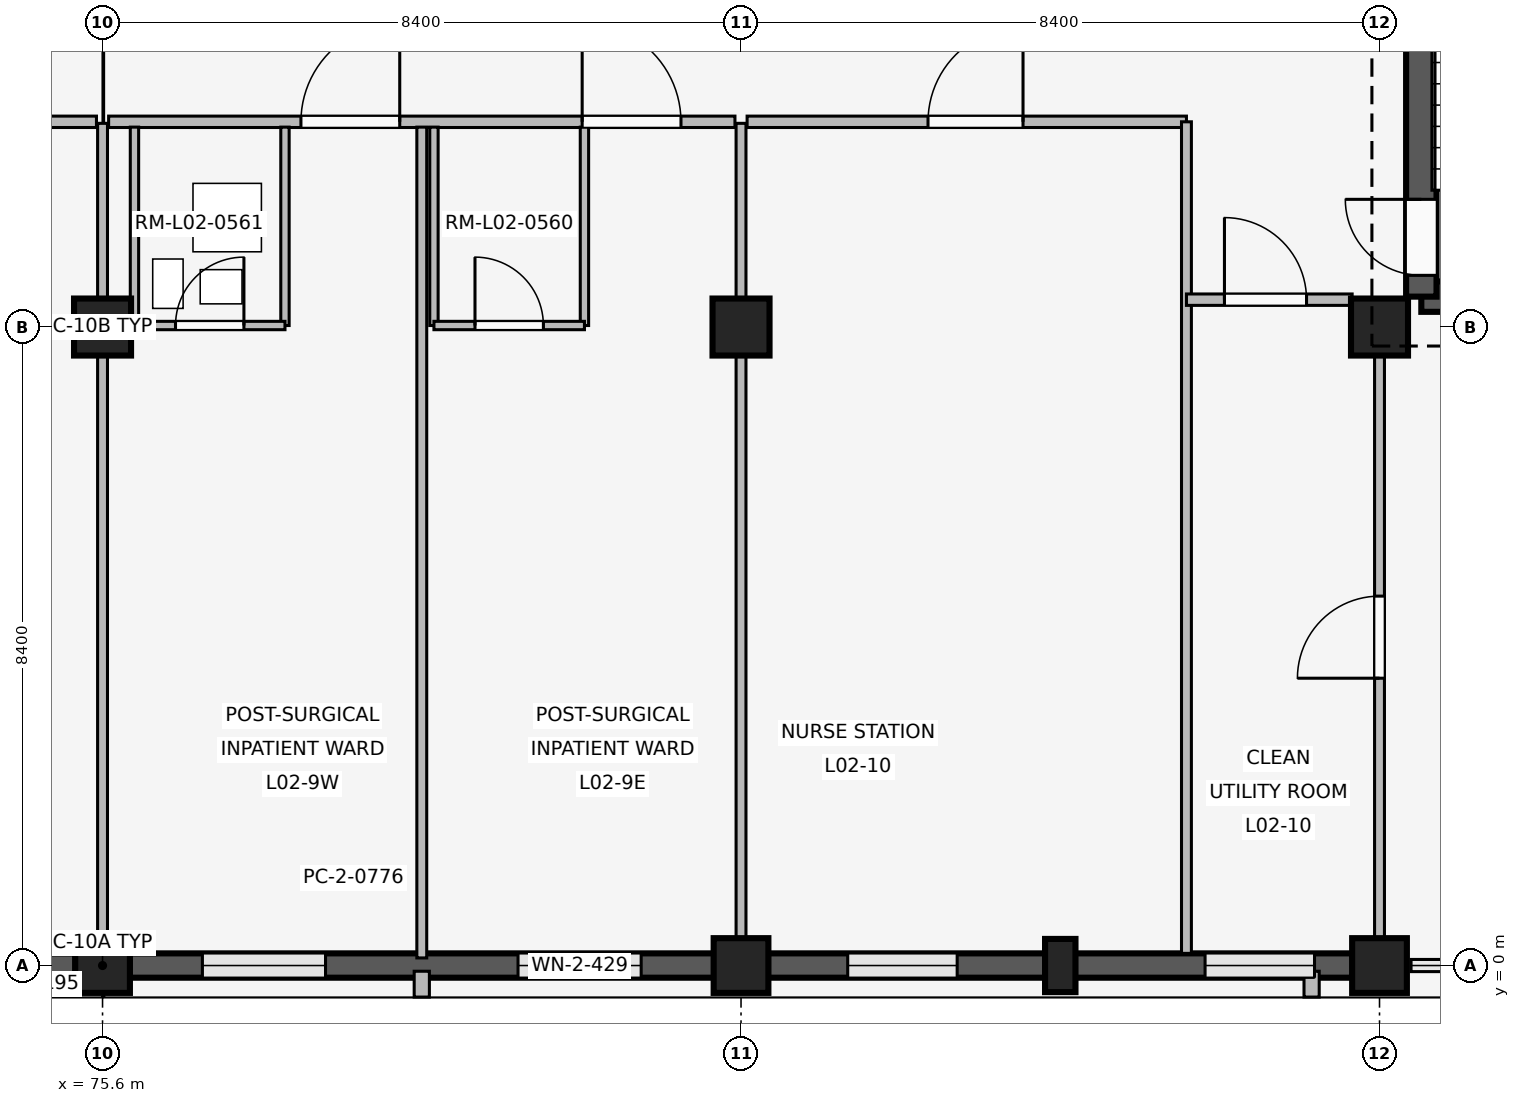
"""IFC4 building model, lengths in metres.
Left out: names, types, materials, properties, quantities, classifications, styles, units other than length and angle.
Written with IfcOpenShell. Run it as: python <this file> out.ifc"""

import sys

from ifc_helpers import new_model, si_unit, direction, frame, frame_2d, origin, origin_2d, place, context, subcontext, project, spatial, rectangle, extrude, element, fill, save


model = new_model("IFC4")
c1 = context("Model", 3, precision=1e-05, world=origin(), true_north=direction((0.0, 1.0)))
c2 = subcontext(c1, "Body", "Model", "MODEL_VIEW")
j1 = project(units=[si_unit("LENGTHUNIT", "METRE"), si_unit("PLANEANGLEUNIT", "RADIAN")], contexts=[c1])
p1 = place(None, origin())
s1 = spatial("IfcSite", under=j1, at=p1, CompositionType="ELEMENT")
p2 = place(p1, origin())
s2 = spatial("IfcBuilding", under=s1, at=p2, CompositionType="ELEMENT")
p3 = place(p2, frame((0.0, 0.0, 8.1)))
s3 = spatial("IfcBuildingStorey", under=s2, at=p3, CompositionType="ELEMENT", Elevation=8.1)
p4 = place(p3, frame((75.6, 0.0, 0.0), z_axis=(0.0, 0.0, 1.0), x_axis=(1.0, 0.0, 0.0)))
e1 = element("IfcColumn", 1, at=p4, inside=s3, PredefinedType="COLUMN", context=c2, shape_type="SweptSolid", body=[
    extrude(rectangle(XDim=0.72, YDim=0.72, at=origin_2d()), origin(), (0.0, 0.0, 1.0), 4.8),
])
p5 = place(p3, frame((75.6, 8.4, 0.0), z_axis=(0.0, 0.0, 1.0), x_axis=(1.0, 0.0, 0.0)))
e2 = element("IfcColumn", 2, at=p5, inside=s3, PredefinedType="COLUMN", context=c2, shape_type="SweptSolid", body=[
    extrude(rectangle(XDim=0.75, YDim=0.75, at=origin_2d()), origin(), (0.0, 0.0, 1.0), 4.8),
])
p6 = place(p3, frame((84.0, 0.0, 0.0), z_axis=(0.0, 0.0, 1.0), x_axis=(1.0, 0.0, 0.0)))
e3 = element("IfcColumn", 3, at=p6, inside=s3, PredefinedType="COLUMN", context=c2, shape_type="SweptSolid", body=[
    extrude(rectangle(XDim=0.72, YDim=0.72, at=origin_2d()), origin(), (0.0, 0.0, 1.0), 4.8),
])
p7 = place(p3, frame((84.0, 8.4, 0.0), z_axis=(0.0, 0.0, 1.0), x_axis=(1.0, 0.0, 0.0)))
e4 = element("IfcColumn", 4, at=p7, inside=s3, PredefinedType="COLUMN", context=c2, shape_type="SweptSolid", body=[
    extrude(rectangle(XDim=0.75, YDim=0.75, at=origin_2d()), origin(), (0.0, 0.0, 1.0), 4.8),
])
p8 = place(p3, frame((92.4, 0.0, 0.0), z_axis=(0.0, 0.0, 1.0), x_axis=(1.0, 0.0, 0.0)))
e5 = element("IfcColumn", 5, at=p8, inside=s3, PredefinedType="COLUMN", context=c2, shape_type="SweptSolid", body=[
    extrude(rectangle(XDim=0.72, YDim=0.72, at=origin_2d()), origin(), (0.0, 0.0, 1.0), 4.8),
])
p9 = place(p3, frame((92.4, 8.4, 0.0), z_axis=(0.0, 0.0, 1.0), x_axis=(1.0, 0.0, 0.0)))
e6 = element("IfcColumn", 6, at=p9, inside=s3, PredefinedType="COLUMN", context=c2, shape_type="SweptSolid", body=[
    extrude(rectangle(XDim=0.75, YDim=0.75, at=origin_2d()), origin(), (0.0, 0.0, 1.0), 4.8),
])
p10 = place(p3, frame((88.2, 0.0, 0.0), z_axis=(0.0, 0.0, 1.0), x_axis=(1.0, 0.0, 0.0)))
e7 = element("IfcColumn", 7, at=p10, inside=s3, PredefinedType="PILASTER", context=c2, shape_type="SweptSolid", body=[
    extrude(rectangle(XDim=0.4, YDim=0.7, at=origin_2d()), origin(), (0.0, 0.0, 1.0), 4.8),
])
p11 = place(p3, frame((75.245, 0.0, 0.0), z_axis=(0.0, 0.0, 1.0), x_axis=(-1.0, 0.0, 0.0)))
e8 = element("IfcWall", 8, at=p11, inside=s3, PredefinedType="SOLIDWALL", context=c2, shape_type="SweptSolid", body=[
    extrude(rectangle(XDim=7.69, YDim=0.32, at=frame_2d((3.845, 0.0))), origin(), (0.0, 0.0, 1.0), 3.86),
])
p12 = place(p11, frame((0.989, 0.0, 0.85)))
e9 = element("IfcOpeningElement", 9, at=p12, cuts=e8, PredefinedType="OPENING", context=c2, shape_type="SweptSolid", body=[
    extrude(rectangle(XDim=1.56, YDim=1.7, at=frame_2d((0.78, 0.85))), frame((0.0, 0.17, 0.0), z_axis=(0.0, -1.0, 0.0), x_axis=(1.0, 0.0, 0.0)), (0.0, 0.0, 1.0), 0.34),
])
p13 = place(p11, frame((5.141, 0.0, 0.85)))
e10 = element("IfcOpeningElement", 10, at=p13, cuts=e8, PredefinedType="OPENING", context=c2, shape_type="SweptSolid", body=[
    extrude(rectangle(XDim=1.56, YDim=1.7, at=frame_2d((0.78, 0.85))), frame((0.0, 0.17, 0.0), z_axis=(0.0, -1.0, 0.0), x_axis=(1.0, 0.0, 0.0)), (0.0, 0.0, 1.0), 0.34),
])
p14 = place(p3, frame((83.645, 0.0, 0.0), z_axis=(0.0, 0.0, 1.0), x_axis=(-1.0, 0.0, 0.0)))
e11 = element("IfcWall", 11, at=p14, inside=s3, PredefinedType="SOLIDWALL", context=c2, shape_type="SweptSolid", body=[
    extrude(rectangle(XDim=7.69, YDim=0.32, at=frame_2d((3.845, 0.0))), origin(), (0.0, 0.0, 1.0), 3.86),
])
p15 = place(p14, frame((0.959, 0.0, 0.85)))
e12 = element("IfcOpeningElement", 12, at=p15, cuts=e11, PredefinedType="OPENING", context=c2, shape_type="SweptSolid", body=[
    extrude(rectangle(XDim=1.62, YDim=1.8, at=frame_2d((0.81, 0.9))), frame((0.0, 0.17, 0.0), z_axis=(0.0, -1.0, 0.0), x_axis=(1.0, 0.0, 0.0)), (0.0, 0.0, 1.0), 0.34),
])
p16 = place(p14, frame((5.111, 0.0, 0.85)))
e13 = element("IfcOpeningElement", 13, at=p16, cuts=e11, PredefinedType="OPENING", context=c2, shape_type="SweptSolid", body=[
    extrude(rectangle(XDim=1.62, YDim=1.8, at=frame_2d((0.81, 0.9))), frame((0.0, 0.17, 0.0), z_axis=(0.0, -1.0, 0.0), x_axis=(1.0, 0.0, 0.0)), (0.0, 0.0, 1.0), 0.34),
])
p17 = place(p3, frame((79.8, -0.075, 0.0), z_axis=(0.0, 0.0, 1.0), x_axis=(0.0, -1.0, 0.0)))
e14 = element("IfcWall", 14, at=p17, inside=s3, PredefinedType="ELEMENTEDWALL", context=c2, shape_type="SweptSolid", body=[
    extrude(rectangle(XDim=0.34, YDim=0.2, at=frame_2d((0.17, 0.0))), origin(), (0.0, 0.0, 1.0), 3.84),
])
p18 = place(p3, frame((92.045, 0.0, 0.0), z_axis=(0.0, 0.0, 1.0), x_axis=(-1.0, 0.0, 0.0)))
e15 = element("IfcWall", 15, at=p18, inside=s3, PredefinedType="SOLIDWALL", context=c2, shape_type="SweptSolid", body=[
    extrude(rectangle(XDim=7.69, YDim=0.32, at=frame_2d((3.845, 0.0))), origin(), (0.0, 0.0, 1.0), 3.86),
])
p19 = place(p18, frame((0.5, 0.0, 0.85)))
e16 = element("IfcOpeningElement", 16, at=p19, cuts=e15, PredefinedType="OPENING", context=c2, shape_type="SweptSolid", body=[
    extrude(rectangle(XDim=1.44, YDim=1.62, at=frame_2d((0.72, 0.81))), frame((0.0, 0.17, 0.0), z_axis=(0.0, -1.0, 0.0), x_axis=(1.0, 0.0, 0.0)), (0.0, 0.0, 1.0), 0.34),
])
p20 = place(p18, frame((5.201, 0.0, 0.85)))
e17 = element("IfcOpeningElement", 17, at=p20, cuts=e15, PredefinedType="OPENING", context=c2, shape_type="SweptSolid", body=[
    extrude(rectangle(XDim=1.44, YDim=1.62, at=frame_2d((0.72, 0.81))), frame((0.0, 0.17, 0.0), z_axis=(0.0, -1.0, 0.0), x_axis=(1.0, 0.0, 0.0)), (0.0, 0.0, 1.0), 0.34),
])
p21 = place(p3, frame((91.507, -0.075, 0.0), z_axis=(0.0, 0.0, 1.0), x_axis=(0.0, -1.0, 0.0)))
e18 = element("IfcWall", 18, at=p21, inside=s3, PredefinedType="ELEMENTEDWALL", context=c2, shape_type="SweptSolid", body=[
    extrude(rectangle(XDim=0.34, YDim=0.2, at=frame_2d((0.17, 0.0))), origin(), (0.0, 0.0, 1.0), 3.84),
])
p22 = place(p3, frame((92.95, 8.8, 0.0), z_axis=(0.0, 0.0, 1.0), x_axis=(1.0, 0.0, 0.0)))
e19 = element("IfcWall", 19, at=p22, inside=s3, PredefinedType="SHEAR", context=c2, shape_type="SweptSolid", body=[
    extrude(rectangle(XDim=7.5, YDim=0.4, at=frame_2d((3.75, 0.0))), origin(), (0.0, 0.0, 1.0), 4.52),
])
p23 = place(p22, frame((4.85, 0.0, 0.0)))
e20 = element("IfcOpeningElement", 20, at=p23, cuts=e19, PredefinedType="OPENING", context=c2, shape_type="SweptSolid", body=[
    extrude(rectangle(XDim=1.2, YDim=2.2, at=frame_2d((0.6, 1.1))), frame((0.0, 0.21, 0.0), z_axis=(0.0, -1.0, 0.0), x_axis=(1.0, 0.0, 0.0)), (0.0, 0.0, 1.0), 0.42),
])
p24 = place(p3, frame((92.95, 8.8, 0.0), z_axis=(0.0, 0.0, 1.0), x_axis=(0.0, 1.0, 0.0)))
e21 = element("IfcWall", 21, at=p24, inside=s3, PredefinedType="SHEAR", context=c2, shape_type="SweptSolid", body=[
    extrude(rectangle(XDim=7.55, YDim=0.4, at=frame_2d((3.775, 0.0))), origin(), (0.0, 0.0, 1.0), 4.52),
])
p25 = place(p24, frame((0.28, 0.0, 0.0)))
e22 = element("IfcOpeningElement", 22, at=p25, cuts=e21, PredefinedType="OPENING", context=c2, shape_type="SweptSolid", body=[
    extrude(rectangle(XDim=1.0, YDim=2.15, at=frame_2d((0.5, 1.075))), frame((0.0, 0.21, 0.0), z_axis=(0.0, -1.0, 0.0), x_axis=(1.0, 0.0, 0.0)), (0.0, 0.0, 1.0), 0.42),
])
p26 = place(p3, frame((67.28, 11.1, 0.0), z_axis=(0.0, 0.0, 1.0), x_axis=(1.0, 0.0, 0.0)))
e23 = element("IfcWall", 23, at=p26, inside=s3, PredefinedType="PARTITIONING", context=c2, shape_type="SweptSolid", body=[
    extrude(rectangle(XDim=8.24, YDim=0.15, at=frame_2d((4.12, 0.0))), origin(), (0.0, 0.0, 1.0), 3.84),
])
p27 = place(p26, frame((2.53, 0.0, 0.0)))
e24 = element("IfcOpeningElement", 24, at=p27, cuts=e23, PredefinedType="OPENING", context=c2, shape_type="SweptSolid", body=[
    extrude(rectangle(XDim=1.35, YDim=2.25, at=frame_2d((0.675, 1.125))), frame((0.0, 0.085, 0.0), z_axis=(0.0, -1.0, 0.0), x_axis=(1.0, 0.0, 0.0)), (0.0, 0.0, 1.0), 0.17),
])
p28 = place(p26, frame((6.23, 0.0, 0.0)))
e25 = element("IfcOpeningElement", 25, at=p28, cuts=e23, PredefinedType="OPENING", context=c2, shape_type="SweptSolid", body=[
    extrude(rectangle(XDim=1.35, YDim=2.25, at=frame_2d((0.675, 1.125))), frame((0.0, 0.085, 0.0), z_axis=(0.0, -1.0, 0.0), x_axis=(1.0, 0.0, 0.0)), (0.0, 0.0, 1.0), 0.17),
])
p29 = place(p3, frame((75.6, 0.14, 0.0), z_axis=(0.0, 0.0, 1.0), x_axis=(0.0, 1.0, 0.0)))
e26 = element("IfcWall", 26, at=p29, inside=s3, PredefinedType="PARTITIONING", context=c2, shape_type="SweptSolid", body=[
    extrude(rectangle(XDim=10.94, YDim=0.13, at=frame_2d((5.47, 0.0))), origin(), (0.0, 0.0, 1.0), 3.84),
])
p30 = place(p3, frame((75.68, 11.1, 0.0), z_axis=(0.0, 0.0, 1.0), x_axis=(1.0, 0.0, 0.0)))
e27 = element("IfcWall", 27, at=p30, inside=s3, PredefinedType="PARTITIONING", context=c2, shape_type="SweptSolid", body=[
    extrude(rectangle(XDim=8.24, YDim=0.15, at=frame_2d((4.12, 0.0))), origin(), (0.0, 0.0, 1.0), 3.84),
])
p31 = place(p30, frame((2.53, 0.0, 0.0)))
e28 = element("IfcOpeningElement", 28, at=p31, cuts=e27, PredefinedType="OPENING", context=c2, shape_type="SweptSolid", body=[
    extrude(rectangle(XDim=1.3, YDim=2.25, at=frame_2d((0.65, 1.125))), frame((0.0, 0.085, 0.0), z_axis=(0.0, -1.0, 0.0), x_axis=(1.0, 0.0, 0.0)), (0.0, 0.0, 1.0), 0.17),
])
p32 = place(p30, frame((6.23, 0.0, 0.0)))
e29 = element("IfcOpeningElement", 29, at=p32, cuts=e27, PredefinedType="OPENING", context=c2, shape_type="SweptSolid", body=[
    extrude(rectangle(XDim=1.3, YDim=2.25, at=frame_2d((0.65, 1.125))), frame((0.0, 0.085, 0.0), z_axis=(0.0, -1.0, 0.0), x_axis=(1.0, 0.0, 0.0)), (0.0, 0.0, 1.0), 0.17),
])
p33 = place(p3, frame((79.8, 0.1, 0.0), z_axis=(0.0, 0.0, 1.0), x_axis=(0.0, 1.0, 0.0)))
e30 = element("IfcWall", 30, at=p33, inside=s3, PredefinedType="PARTITIONING", context=c2, shape_type="SweptSolid", body=[
    extrude(rectangle(XDim=10.93, YDim=0.13, at=frame_2d((5.465, 0.0))), origin(), (0.0, 0.0, 1.0), 3.84),
])
for number, where, z_axis, x_axis in (
    (31, (76.02, 8.42, 0.0), (0.0, 0.0, 1.0), (0.0, 1.0, 0.0)),
    (32, (78.0, 8.42, 0.0), (0.0, 0.0, 1.0), (0.0, 1.0, 0.0)),
):
    element("IfcWall", number, at=place(p3, frame(where, z_axis=z_axis, x_axis=x_axis)), inside=s3, PredefinedType="PARTITIONING", context=c2, shape_type="SweptSolid", body=[
        extrude(rectangle(XDim=2.61, YDim=0.11, at=frame_2d((1.305, 0.0))), origin(), (0.0, 0.0, 1.0), 3.84),
    ])
p34 = place(p3, frame((76.02, 8.42, 0.0), z_axis=(0.0, 0.0, 1.0), x_axis=(1.0, 0.0, 0.0)))
e33 = element("IfcWall", 33, at=p34, inside=s3, PredefinedType="PARTITIONING", context=c2, shape_type="SweptSolid", body=[
    extrude(rectangle(XDim=1.98, YDim=0.11, at=frame_2d((0.99, 0.0))), origin(), (0.0, 0.0, 1.0), 3.84),
])
p35 = place(p34, frame((0.54, 0.0, 0.0)))
e34 = element("IfcOpeningElement", 34, at=p35, cuts=e33, PredefinedType="OPENING", context=c2, shape_type="SweptSolid", body=[
    extrude(rectangle(XDim=0.9, YDim=2.1, at=frame_2d((0.45, 1.05))), frame((0.0, 0.065, 0.0), z_axis=(0.0, -1.0, 0.0), x_axis=(1.0, 0.0, 0.0)), (0.0, 0.0, 1.0), 0.13),
])
for number, where, z_axis, x_axis in (
    (35, (79.96, 8.42, 0.0), (0.0, 0.0, 1.0), (0.0, 1.0, 0.0)),
    (36, (81.94, 8.42, 0.0), (0.0, 0.0, 1.0), (0.0, 1.0, 0.0)),
):
    element("IfcWall", number, at=place(p3, frame(where, z_axis=z_axis, x_axis=x_axis)), inside=s3, PredefinedType="PARTITIONING", context=c2, shape_type="SweptSolid", body=[
        extrude(rectangle(XDim=2.61, YDim=0.11, at=frame_2d((1.305, 0.0))), origin(), (0.0, 0.0, 1.0), 3.84),
    ])
p36 = place(p3, frame((79.96, 8.42, 0.0), z_axis=(0.0, 0.0, 1.0), x_axis=(1.0, 0.0, 0.0)))
e37 = element("IfcWall", 37, at=p36, inside=s3, PredefinedType="PARTITIONING", context=c2, shape_type="SweptSolid", body=[
    extrude(rectangle(XDim=1.98, YDim=0.11, at=frame_2d((0.99, 0.0))), origin(), (0.0, 0.0, 1.0), 3.84),
])
p37 = place(p36, frame((0.54, 0.0, 0.0)))
e38 = element("IfcOpeningElement", 38, at=p37, cuts=e37, PredefinedType="OPENING", context=c2, shape_type="SweptSolid", body=[
    extrude(rectangle(XDim=0.9, YDim=2.1, at=frame_2d((0.45, 1.05))), frame((0.0, 0.065, 0.0), z_axis=(0.0, -1.0, 0.0), x_axis=(1.0, 0.0, 0.0)), (0.0, 0.0, 1.0), 0.13),
])
p38 = place(p3, frame((78.45, 1.15, 0.0), z_axis=(0.0, 0.0, 1.0), x_axis=(1.0, 0.0, 0.0)))
e39 = element("IfcWall", 39, at=p38, inside=s3, PredefinedType="PLUMBINGWALL", context=c2, shape_type="SweptSolid", body=[
    extrude(rectangle(XDim=0.9, YDim=0.24, at=frame_2d((0.45, 0.0))), origin(), (0.0, 0.0, 1.0), 3.84),
])
p39 = place(p3, frame((84.0, 0.14, 0.0), z_axis=(0.0, 0.0, 1.0), x_axis=(0.0, 1.0, 0.0)))
e40 = element("IfcWall", 40, at=p39, inside=s3, PredefinedType="PARTITIONING", context=c2, shape_type="SweptSolid", body=[
    extrude(rectangle(XDim=10.94, YDim=0.13, at=frame_2d((5.47, 0.0))), origin(), (0.0, 0.0, 1.0), 3.84),
])
p40 = place(p3, frame((84.08, 11.1, 0.0), z_axis=(0.0, 0.0, 1.0), x_axis=(1.0, 0.0, 0.0)))
e41 = element("IfcWall", 41, at=p40, inside=s3, PredefinedType="PARTITIONING", context=c2, shape_type="SweptSolid", body=[
    extrude(rectangle(XDim=5.78, YDim=0.15, at=frame_2d((2.89, 0.0))), origin(), (0.0, 0.0, 1.0), 3.84),
])
p41 = place(p40, frame((2.38, 0.0, 0.0)))
e42 = element("IfcOpeningElement", 42, at=p41, cuts=e41, PredefinedType="OPENING", context=c2, shape_type="SweptSolid", body=[
    extrude(rectangle(XDim=1.25, YDim=2.2, at=frame_2d((0.625, 1.1))), frame((0.0, 0.085, 0.0), z_axis=(0.0, -1.0, 0.0), x_axis=(1.0, 0.0, 0.0)), (0.0, 0.0, 1.0), 0.17),
])
p42 = place(p3, frame((89.86, 0.16, 0.0), z_axis=(0.0, 0.0, 1.0), x_axis=(0.0, 1.0, 0.0)))
e43 = element("IfcWall", 43, at=p42, inside=s3, PredefinedType="PARTITIONING", context=c2, shape_type="SweptSolid", body=[
    extrude(rectangle(XDim=10.94, YDim=0.13, at=frame_2d((5.47, 0.0))), origin(), (0.0, 0.0, 1.0), 3.84),
])
p43 = place(p3, frame((89.86, 8.76, 0.0), z_axis=(0.0, 0.0, 1.0), x_axis=(1.0, 0.0, 0.0)))
e44 = element("IfcWall", 44, at=p43, inside=s3, PredefinedType="PARTITIONING", context=c2, shape_type="SweptSolid", body=[
    extrude(rectangle(XDim=2.18, YDim=0.15, at=frame_2d((1.09, 0.0))), origin(), (0.0, 0.0, 1.0), 3.84),
])
p44 = place(p43, frame((0.5, 0.0, 0.0)))
e45 = element("IfcOpeningElement", 45, at=p44, cuts=e44, PredefinedType="OPENING", context=c2, shape_type="SweptSolid", body=[
    extrude(rectangle(XDim=1.08, YDim=2.15, at=frame_2d((0.54, 1.075))), frame((0.0, 0.085, 0.0), z_axis=(0.0, -1.0, 0.0), x_axis=(1.0, 0.0, 0.0)), (0.0, 0.0, 1.0), 0.17),
])
p45 = place(p3, frame((92.4, 0.14, 0.0), z_axis=(0.0, 0.0, 1.0), x_axis=(0.0, 1.0, 0.0)))
e46 = element("IfcWall", 46, at=p45, inside=s3, PredefinedType="PARTITIONING", context=c2, shape_type="SweptSolid", body=[
    extrude(rectangle(XDim=8.21, YDim=0.13, at=frame_2d((4.105, 0.0))), origin(), (0.0, 0.0, 1.0), 3.84),
])
p46 = place(p45, frame((3.64, 0.0, 0.0)))
e47 = element("IfcOpeningElement", 47, at=p46, cuts=e46, PredefinedType="OPENING", context=c2, shape_type="SweptSolid", body=[
    extrude(rectangle(XDim=1.08, YDim=2.15, at=frame_2d((0.54, 1.075))), frame((0.0, 0.075, 0.0), z_axis=(0.0, -1.0, 0.0), x_axis=(1.0, 0.0, 0.0)), (0.0, 0.0, 1.0), 0.15),
])
p47 = place(p15, origin())
e48 = element("IfcWindow", 48, at=p47, inside=s3, PartitioningType="SINGLE_PANEL", PredefinedType="WINDOW", context=c2, shape_type="SweptSolid", body=[
    extrude(rectangle(XDim=1.62, YDim=1.8, at=frame_2d((0.81, 0.9))), frame((0.0, 0.03, 0.0), z_axis=(0.0, -1.0, 0.0), x_axis=(1.0, 0.0, 0.0)), (0.0, 0.0, 1.0), 0.06),
])
fill(e12, e48)
p48 = place(p16, origin())
e49 = element("IfcWindow", 49, at=p48, inside=s3, PartitioningType="SINGLE_PANEL", PredefinedType="WINDOW", context=c2, shape_type="SweptSolid", body=[
    extrude(rectangle(XDim=1.62, YDim=1.8, at=frame_2d((0.81, 0.9))), frame((0.0, 0.03, 0.0), z_axis=(0.0, -1.0, 0.0), x_axis=(1.0, 0.0, 0.0)), (0.0, 0.0, 1.0), 0.06),
])
fill(e13, e49)
p49 = place(p19, origin())
e50 = element("IfcWindow", 50, at=p49, inside=s3, PartitioningType="SINGLE_PANEL", PredefinedType="WINDOW", context=c2, shape_type="SweptSolid", body=[
    extrude(rectangle(XDim=1.44, YDim=1.62, at=frame_2d((0.72, 0.81))), frame((0.0, 0.03, 0.0), z_axis=(0.0, -1.0, 0.0), x_axis=(1.0, 0.0, 0.0)), (0.0, 0.0, 1.0), 0.06),
])
fill(e16, e50)
p50 = place(p20, origin())
e51 = element("IfcWindow", 51, at=p50, inside=s3, PartitioningType="SINGLE_PANEL", PredefinedType="WINDOW", context=c2, shape_type="SweptSolid", body=[
    extrude(rectangle(XDim=1.44, YDim=1.62, at=frame_2d((0.72, 0.81))), frame((0.0, 0.03, 0.0), z_axis=(0.0, -1.0, 0.0), x_axis=(1.0, 0.0, 0.0)), (0.0, 0.0, 1.0), 0.06),
])
fill(e17, e51)
p51 = place(p25, origin())
e52 = element("IfcDoor", 52, at=p51, inside=s3, OperationType="SINGLE_SWING_RIGHT", PredefinedType="DOOR", context=c2, shape_type="SweptSolid", body=[
    extrude(rectangle(XDim=1.0, YDim=2.15, at=frame_2d((0.5, 1.075))), frame((0.0, 0.025, 0.0), z_axis=(0.0, -1.0, 0.0), x_axis=(1.0, 0.0, 0.0)), (0.0, 0.0, 1.0), 0.05),
])
fill(e22, e52)
p52 = place(p31, origin())
e53 = element("IfcDoor", 53, at=p52, inside=s3, OperationType="SINGLE_SWING_RIGHT", PredefinedType="DOOR", context=c2, shape_type="SweptSolid", body=[
    extrude(rectangle(XDim=1.3, YDim=2.25, at=frame_2d((0.65, 1.125))), frame((0.0, 0.025, 0.0), z_axis=(0.0, -1.0, 0.0), x_axis=(1.0, 0.0, 0.0)), (0.0, 0.0, 1.0), 0.05),
])
fill(e28, e53)
p53 = place(p32, origin())
e54 = element("IfcDoor", 54, at=p53, inside=s3, OperationType="SINGLE_SWING_LEFT", PredefinedType="DOOR", context=c2, shape_type="SweptSolid", body=[
    extrude(rectangle(XDim=1.3, YDim=2.25, at=frame_2d((0.65, 1.125))), frame((0.0, 0.025, 0.0), z_axis=(0.0, -1.0, 0.0), x_axis=(1.0, 0.0, 0.0)), (0.0, 0.0, 1.0), 0.05),
])
fill(e29, e54)
p54 = place(p35, origin())
e55 = element("IfcDoor", 55, at=p54, inside=s3, OperationType="SINGLE_SWING_RIGHT", PredefinedType="DOOR", context=c2, shape_type="SweptSolid", body=[
    extrude(rectangle(XDim=0.9, YDim=2.1, at=frame_2d((0.45, 1.05))), frame((0.0, 0.025, 0.0), z_axis=(0.0, -1.0, 0.0), x_axis=(1.0, 0.0, 0.0)), (0.0, 0.0, 1.0), 0.05),
])
fill(e34, e55)
p55 = place(p37, origin())
e56 = element("IfcDoor", 56, at=p55, inside=s3, OperationType="SINGLE_SWING_LEFT", PredefinedType="DOOR", context=c2, shape_type="SweptSolid", body=[
    extrude(rectangle(XDim=0.9, YDim=2.1, at=frame_2d((0.45, 1.05))), frame((0.0, 0.025, 0.0), z_axis=(0.0, -1.0, 0.0), x_axis=(1.0, 0.0, 0.0)), (0.0, 0.0, 1.0), 0.05),
])
fill(e38, e56)
p56 = place(p41, origin())
e57 = element("IfcDoor", 57, at=p56, inside=s3, OperationType="SINGLE_SWING_RIGHT", PredefinedType="DOOR", context=c2, shape_type="SweptSolid", body=[
    extrude(rectangle(XDim=1.25, YDim=2.2, at=frame_2d((0.625, 1.1))), frame((0.0, 0.025, 0.0), z_axis=(0.0, -1.0, 0.0), x_axis=(1.0, 0.0, 0.0)), (0.0, 0.0, 1.0), 0.05),
])
fill(e42, e57)
p57 = place(p44, origin())
e58 = element("IfcDoor", 58, at=p57, inside=s3, OperationType="SINGLE_SWING_LEFT", PredefinedType="DOOR", context=c2, shape_type="SweptSolid", body=[
    extrude(rectangle(XDim=1.08, YDim=2.15, at=frame_2d((0.54, 1.075))), frame((0.0, 0.025, 0.0), z_axis=(0.0, -1.0, 0.0), x_axis=(1.0, 0.0, 0.0)), (0.0, 0.0, 1.0), 0.05),
])
fill(e45, e58)
p58 = place(p46, origin())
e59 = element("IfcDoor", 59, at=p58, inside=s3, OperationType="SINGLE_SWING_LEFT", PredefinedType="DOOR", context=c2, shape_type="SweptSolid", body=[
    extrude(rectangle(XDim=1.08, YDim=2.15, at=frame_2d((0.54, 1.075))), frame((0.0, 0.025, 0.0), z_axis=(0.0, -1.0, 0.0), x_axis=(1.0, 0.0, 0.0)), (0.0, 0.0, 1.0), 0.05),
])
fill(e47, e59)
save(model, sys.argv[1])
